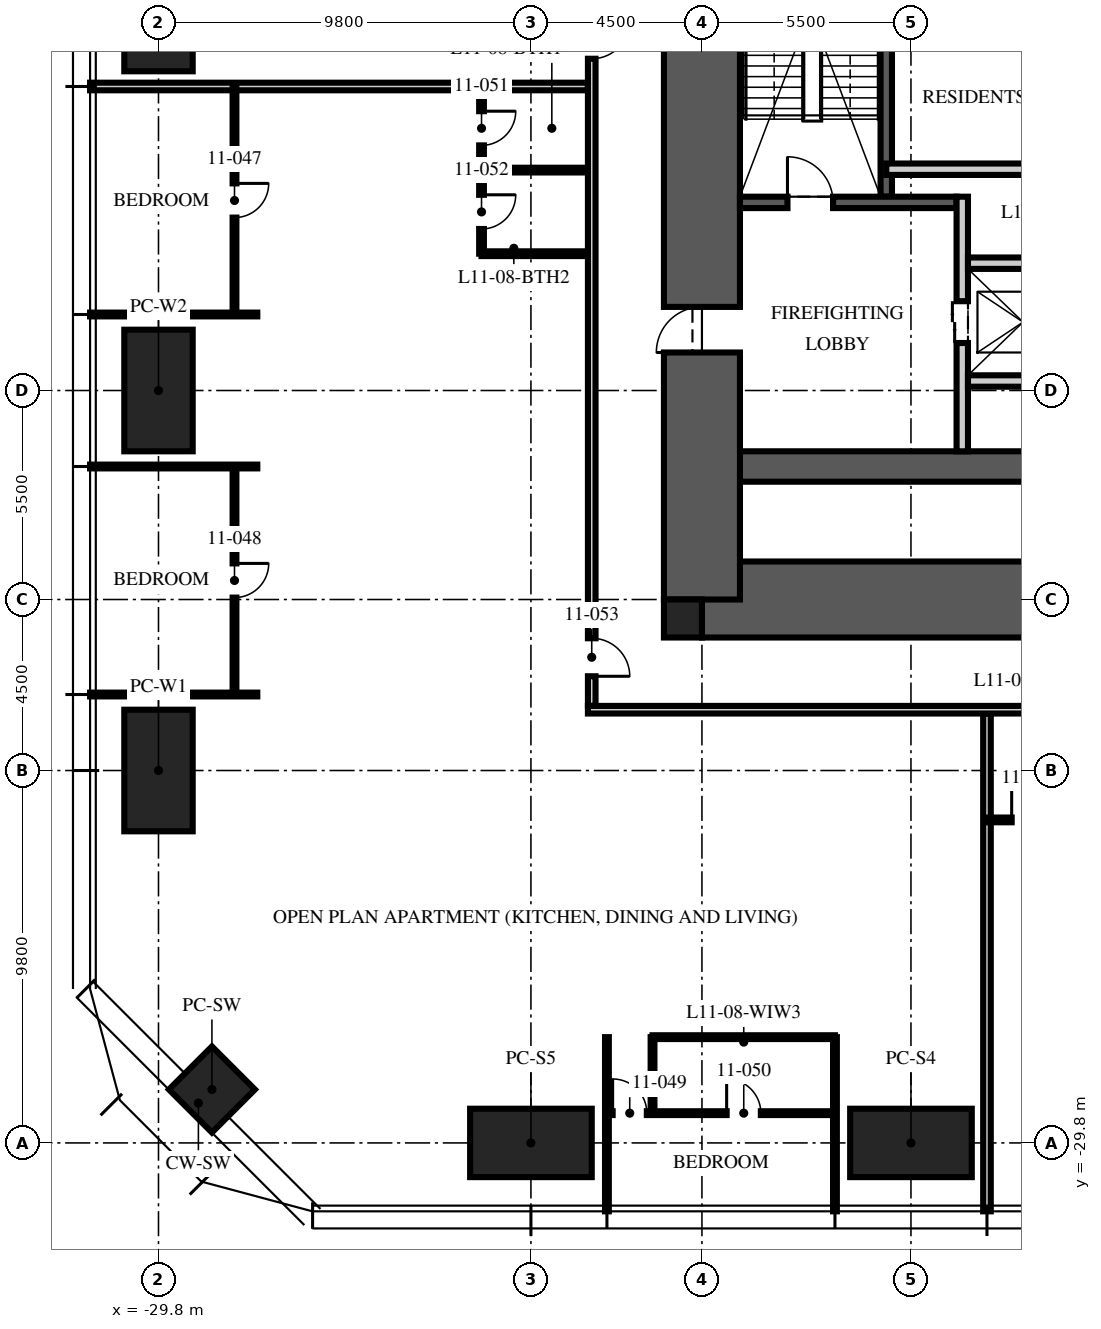
"""IFC4 building model, lengths in metres.
Left out: names, types, materials, properties, quantities, classifications, styles, units other than length and angle.
Written with IfcOpenShell. Run it as: python <this file> out.ifc"""

import sys

from ifc_helpers import new_model, si_unit, direction, frame, frame_2d, origin, origin_2d, place, context, subcontext, project, spatial, rectangle, hollow_rectangle, extrude, element, fill, save


model = new_model("IFC4")
c1 = context("Model", 3, precision=1e-05, world=origin(), true_north=direction((0.0, 1.0)))
c2 = subcontext(c1, "Body", "Model", "MODEL_VIEW")
j1 = project(units=[si_unit("LENGTHUNIT", "METRE"), si_unit("PLANEANGLEUNIT", "RADIAN")], contexts=[c1])
p1 = place(None, origin())
s1 = spatial("IfcSite", under=j1, at=p1, CompositionType="ELEMENT")
p2 = place(p1, origin())
s2 = spatial("IfcBuilding", under=s1, at=p2, CompositionType="ELEMENT")
p3 = place(p2, frame((0.0, 0.0, 47.25)))
s3 = spatial("IfcBuildingStorey", under=s2, at=p3, CompositionType="ELEMENT", Elevation=47.25)
p4 = place(p3, frame((-15.5, -15.5, -0.25), z_axis=(0.0, 0.0, 1.0), x_axis=(1.0, 0.0, 0.0)))
e1 = element("IfcWall", 1, at=p4, inside=s3, PredefinedType="SHEAR", context=c2, shape_type="SweptSolid", body=[
    extrude(rectangle(XDim=31.0, YDim=2.0, at=frame_2d((15.5, 0.0))), origin(), (0.0, 0.0, 1.0), 3.75),
])
p5 = place(p3, frame((-15.5, -12.0, -0.25), z_axis=(0.0, 0.0, 1.0), x_axis=(1.0, 0.0, 0.0)))
e2 = element("IfcWall", 2, at=p5, inside=s3, PredefinedType="SHEAR", context=c2, shape_type="SweptSolid", body=[
    extrude(rectangle(XDim=31.0, YDim=0.8, at=frame_2d((15.5, 0.0))), origin(), (0.0, 0.0, 1.0), 3.75),
])
p6 = place(p3, frame((-15.5, -15.5, -0.25), z_axis=(0.0, 0.0, 1.0), x_axis=(0.0, 1.0, 0.0)))
e3 = element("IfcWall", 3, at=p6, inside=s3, PredefinedType="SHEAR", context=c2, shape_type="SweptSolid", body=[
    extrude(rectangle(XDim=31.0, YDim=2.0, at=frame_2d((15.5, 0.0))), origin(), (0.0, 0.0, 1.0), 3.75),
])
p7 = place(p6, frame((6.5, 0.0, 0.25)))
e4 = element("IfcOpeningElement", 4, at=p7, cuts=e3, PredefinedType="OPENING", context=c2, shape_type="SweptSolid", body=[
    extrude(rectangle(XDim=1.2, YDim=2.1, at=frame_2d((0.6, 1.05))), frame((0.0, 1.01, 0.0), z_axis=(0.0, -1.0, 0.0), x_axis=(1.0, 0.0, 0.0)), (0.0, 0.0, 1.0), 2.02),
])
p8 = place(p6, frame((23.0, 0.0, 0.25)))
e5 = element("IfcOpeningElement", 5, at=p8, cuts=e3, PredefinedType="OPENING", context=c2, shape_type="SweptSolid", body=[
    extrude(rectangle(XDim=1.8, YDim=2.1, at=frame_2d((0.9, 1.05))), frame((0.0, 1.01, 0.0), z_axis=(0.0, -1.0, 0.0), x_axis=(1.0, 0.0, 0.0)), (0.0, 0.0, 1.0), 2.02),
])
p9 = place(p3, frame((-16.0, -16.0, -0.25), z_axis=(0.0, 0.0, 1.0), x_axis=(1.0, 0.0, 0.0)))
e6 = element("IfcColumn", 6, at=p9, inside=s3, PredefinedType="COLUMN", context=c2, shape_type="SweptSolid", body=[
    extrude(rectangle(XDim=1.0, YDim=1.0, at=origin_2d()), origin(), (0.0, 0.0, 1.0), 3.75),
])
for number, where, z_axis, x_axis in (
    (7, (-10.0, -29.8, 0.0), (0.0, 0.0, 1.0), (1.0, 0.0, 0.0)),
    (8, (-20.0, -29.8, 0.0), (0.0, 0.0, 1.0), (1.0, 0.0, 0.0)),
    (9, (-29.8, -20.0, 0.0), (0.0, 0.0, 1.0), (0.0, 1.0, 0.0)),
    (10, (-29.8, -10.0, 0.0), (0.0, 0.0, 1.0), (0.0, 1.0, 0.0)),
    (11, (-29.8, 0.0, 0.0), (0.0, 0.0, 1.0), (0.0, 1.0, 0.0)),
):
    element("IfcColumn", number, at=place(p3, frame(where, z_axis=z_axis, x_axis=x_axis)), inside=s3, PredefinedType="COLUMN", context=c2, shape_type="SweptSolid", body=[
        extrude(hollow_rectangle(XDim=3.2, YDim=1.8, WallThickness=0.2, at=origin_2d()), origin(), (0.0, 0.0, 1.0), 3.75),
    ])
p10 = place(p3, frame((-28.394, -28.394, 0.0), z_axis=(0.0, 0.0, 1.0), x_axis=(0.707106781187, -0.707106781187, 0.0)))
e12 = element("IfcColumn", 12, at=p10, inside=s3, PredefinedType="COLUMN", context=c2, shape_type="SweptSolid", body=[
    extrude(hollow_rectangle(XDim=1.6, YDim=1.6, WallThickness=0.1, at=origin_2d()), origin(), (0.0, 0.0, 1.0), 3.75),
])
p11 = place(p3, frame((-10.65, -4.9, 0.0), z_axis=(0.0, 0.0, 1.0), x_axis=(0.0, 1.0, 0.0)))
e13 = element("IfcWall", 13, at=p11, inside=s3, PredefinedType="SOLIDWALL", context=c2, shape_type="SweptSolid", body=[
    extrude(rectangle(XDim=10.1, YDim=0.3, at=frame_2d((5.05, 0.0))), origin(), (0.0, 0.0, 1.0), 3.5),
])
p12 = place(p3, frame((-14.5, -5.05, 0.0), z_axis=(0.0, 0.0, 1.0), x_axis=(1.0, 0.0, 0.0)))
e14 = element("IfcWall", 14, at=p12, inside=s3, PredefinedType="SOLIDWALL", context=c2, shape_type="SweptSolid", body=[
    extrude(rectangle(XDim=5.7, YDim=0.3, at=frame_2d((2.85, 0.0))), origin(), (0.0, 0.0, 1.0), 3.5),
])
p13 = place(p12, frame((1.25, 0.0, 0.0)))
e15 = element("IfcOpeningElement", 15, at=p13, cuts=e14, PredefinedType="OPENING", context=c2, shape_type="SweptSolid", body=[
    extrude(rectangle(XDim=1.2, YDim=2.1, at=frame_2d((0.6, 1.05))), frame((0.0, 0.16, 0.0), z_axis=(0.0, -1.0, 0.0), x_axis=(1.0, 0.0, 0.0)), (0.0, 0.0, 1.0), 0.32),
])
p14 = place(p3, frame((-8.65, -11.6, 0.0), z_axis=(0.0, 0.0, 1.0), x_axis=(0.0, 1.0, 0.0)))
e16 = element("IfcWall", 16, at=p14, inside=s3, PredefinedType="PARTITIONING", context=c2, shape_type="SweptSolid", body=[
    extrude(rectangle(XDim=6.7, YDim=0.3, at=frame_2d((3.35, 0.0))), origin(), (0.0, 0.0, 1.0), 3.5),
])
p15 = place(p14, frame((2.85, 0.0, 0.0)))
e17 = element("IfcOpeningElement", 17, at=p15, cuts=e16, PredefinedType="OPENING", context=c2, shape_type="SweptSolid", body=[
    extrude(rectangle(XDim=1.1, YDim=2.1, at=frame_2d((0.55, 1.05))), frame((0.0, 0.16, 0.0), z_axis=(0.0, -1.0, 0.0), x_axis=(1.0, 0.0, 0.0)), (0.0, 0.0, 1.0), 0.32),
])
p16 = place(p3, frame((-8.5, -6.65, 0.0), z_axis=(0.0, 0.0, 1.0), x_axis=(1.0, 0.0, 0.0)))
e18 = element("IfcWall", 18, at=p16, inside=s3, PredefinedType="PARTITIONING", context=c2, shape_type="SweptSolid", body=[
    extrude(rectangle(XDim=17.0, YDim=0.3, at=frame_2d((8.5, 0.0))), origin(), (0.0, 0.0, 1.0), 3.5),
])
p17 = place(p16, frame((7.8, 0.0, 0.0)))
e19 = element("IfcOpeningElement", 19, at=p17, cuts=e18, PredefinedType="OPENING", context=c2, shape_type="SweptSolid", body=[
    extrude(rectangle(XDim=1.3, YDim=2.4, at=frame_2d((0.65, 1.2))), frame((0.0, 0.16, 0.0), z_axis=(0.0, -1.0, 0.0), x_axis=(1.0, 0.0, 0.0)), (0.0, 0.0, 1.0), 0.32),
])
p18 = place(p16, frame((5.65, 0.0, 0.0)))
e20 = element("IfcOpeningElement", 20, at=p18, cuts=e18, PredefinedType="OPENING", context=c2, shape_type="SweptSolid", body=[
    extrude(rectangle(XDim=0.9, YDim=2.1, at=frame_2d((0.45, 1.05))), frame((0.0, 0.16, 0.0), z_axis=(0.0, -1.0, 0.0), x_axis=(1.0, 0.0, 0.0)), (0.0, 0.0, 1.0), 0.32),
])
p19 = place(p16, frame((10.4, 0.0, 0.0)))
e21 = element("IfcOpeningElement", 21, at=p19, cuts=e18, PredefinedType="OPENING", context=c2, shape_type="SweptSolid", body=[
    extrude(rectangle(XDim=0.9, YDim=2.1, at=frame_2d((0.45, 1.05))), frame((0.0, 0.16, 0.0), z_axis=(0.0, -1.0, 0.0), x_axis=(1.0, 0.0, 0.0)), (0.0, 0.0, 1.0), 0.32),
])
p20 = place(p3, frame((-8.5, -9.75, 0.0), z_axis=(0.0, 0.0, 1.0), x_axis=(1.0, 0.0, 0.0)))
e22 = element("IfcWall", 22, at=p20, inside=s3, PredefinedType="PARTITIONING", context=c2, shape_type="SweptSolid", body=[
    extrude(rectangle(XDim=2.9, YDim=0.3, at=frame_2d((1.45, 0.0))), origin(), (0.0, 0.0, 1.0), 3.5),
])
p21 = place(p3, frame((-10.65, -4.177, 0.0), z_axis=(0.0, 0.0, 1.0), x_axis=(1.0, 0.0, 0.0)))
e23 = element("IfcWall", 23, at=p21, inside=s3, PredefinedType="PARTITIONING", context=c2, shape_type="SweptSolid", body=[
    extrude(rectangle(XDim=6.45, YDim=0.3, at=frame_2d((3.225, 0.0))), origin(), (0.0, 0.0, 1.0), 3.5),
])
p22 = place(p3, frame((-18.5, -2.0, 0.0), z_axis=(0.0, 0.0, 1.0), x_axis=(-1.0, 0.0, 0.0)))
e24 = element("IfcWall", 24, at=p22, inside=s3, PredefinedType="PARTITIONING", context=c2, shape_type="SweptSolid", body=[
    extrude(rectangle(XDim=13.1, YDim=0.2, at=frame_2d((6.55, 0.0))), origin(), (0.0, 0.0, 1.0), 2.71),
])
for number, where, z_axis, x_axis in (
    (25, (-27.2, -8.0, 0.0), (0.0, 0.0, 1.0), (-1.0, 0.0, 0.0)),
    (26, (-27.2, -12.0, 0.0), (0.0, 0.0, 1.0), (-1.0, 0.0, 0.0)),
    (27, (-27.2, -18.0, 0.0), (0.0, 0.0, 1.0), (-1.0, 0.0, 0.0)),
):
    element("IfcWall", number, at=place(p3, frame(where, z_axis=z_axis, x_axis=x_axis)), inside=s3, PredefinedType="PARTITIONING", context=c2, shape_type="SweptSolid", body=[
        extrude(rectangle(XDim=4.4, YDim=0.1, at=frame_2d((2.2, 0.0))), origin(), (0.0, 0.0, 1.0), 2.71),
    ])
for number, where, z_axis, x_axis in (
    (28, (-18.0, -27.017, 0.0), (0.0, 0.0, 1.0), (0.0, -1.0, 0.0)),
    (29, (-12.0, -27.017, 0.0), (0.0, 0.0, 1.0), (0.0, -1.0, 0.0)),
):
    element("IfcWall", number, at=place(p3, frame(where, z_axis=z_axis, x_axis=x_axis)), inside=s3, PredefinedType="PARTITIONING", context=c2, shape_type="SweptSolid", body=[
        extrude(rectangle(XDim=4.583, YDim=0.1, at=frame_2d((2.292, 0.0))), origin(), (0.0, 0.0, 1.0), 2.71),
    ])
p23 = place(p3, frame((-8.0, -18.5, 0.0), z_axis=(0.0, 0.0, 1.0), x_axis=(0.0, -1.0, 0.0)))
e30 = element("IfcWall", 30, at=p23, inside=s3, PredefinedType="PARTITIONING", context=c2, shape_type="SweptSolid", body=[
    extrude(rectangle(XDim=13.1, YDim=0.2, at=frame_2d((6.55, 0.0))), origin(), (0.0, 0.0, 1.0), 2.71),
])
p24 = place(p3, frame((-27.8, -2.0, 0.0), z_axis=(0.0, 0.0, 1.0), x_axis=(0.0, -1.0, 0.0)))
e31 = element("IfcWall", 31, at=p24, inside=s3, PredefinedType="PARTITIONING", context=c2, shape_type="SweptSolid", body=[
    extrude(rectangle(XDim=6.0, YDim=0.1, at=frame_2d((3.0, 0.0))), origin(), (0.0, 0.0, 1.0), 2.61),
])
p25 = place(p24, frame((2.55, 0.0, 0.0)))
e32 = element("IfcOpeningElement", 32, at=p25, cuts=e31, PredefinedType="OPENING", context=c2, shape_type="SweptSolid", body=[
    extrude(rectangle(XDim=0.9, YDim=2.1, at=frame_2d((0.45, 1.05))), frame((0.0, 0.06, 0.0), z_axis=(0.0, -1.0, 0.0), x_axis=(1.0, 0.0, 0.0)), (0.0, 0.0, 1.0), 0.12),
])
p26 = place(p3, frame((-27.8, -12.0, 0.0), z_axis=(0.0, 0.0, 1.0), x_axis=(0.0, -1.0, 0.0)))
e33 = element("IfcWall", 33, at=p26, inside=s3, PredefinedType="PARTITIONING", context=c2, shape_type="SweptSolid", body=[
    extrude(rectangle(XDim=6.0, YDim=0.1, at=frame_2d((3.0, 0.0))), origin(), (0.0, 0.0, 1.0), 2.61),
])
p27 = place(p26, frame((2.55, 0.0, 0.0)))
e34 = element("IfcOpeningElement", 34, at=p27, cuts=e33, PredefinedType="OPENING", context=c2, shape_type="SweptSolid", body=[
    extrude(rectangle(XDim=0.9, YDim=2.1, at=frame_2d((0.45, 1.05))), frame((0.0, 0.06, 0.0), z_axis=(0.0, -1.0, 0.0), x_axis=(1.0, 0.0, 0.0)), (0.0, 0.0, 1.0), 0.12),
])
p28 = place(p3, frame((-18.0, -29.017, 0.0), z_axis=(0.0, 0.0, 1.0), x_axis=(1.0, 0.0, 0.0)))
e35 = element("IfcWall", 35, at=p28, inside=s3, PredefinedType="PARTITIONING", context=c2, shape_type="SweptSolid", body=[
    extrude(rectangle(XDim=6.0, YDim=0.1, at=frame_2d((3.0, 0.0))), origin(), (0.0, 0.0, 1.0), 2.61),
])
p29 = place(p28, frame((0.15, 0.0, 0.0)))
e36 = element("IfcOpeningElement", 36, at=p29, cuts=e35, PredefinedType="OPENING", context=c2, shape_type="SweptSolid", body=[
    extrude(rectangle(XDim=0.9, YDim=2.1, at=frame_2d((0.45, 1.05))), frame((0.0, 0.06, 0.0), z_axis=(0.0, -1.0, 0.0), x_axis=(1.0, 0.0, 0.0)), (0.0, 0.0, 1.0), 0.12),
])
p30 = place(p28, frame((3.15, 0.0, 0.0)))
e37 = element("IfcOpeningElement", 37, at=p30, cuts=e35, PredefinedType="OPENING", context=c2, shape_type="SweptSolid", body=[
    extrude(rectangle(XDim=0.9, YDim=2.1, at=frame_2d((0.45, 1.05))), frame((0.0, 0.06, 0.0), z_axis=(0.0, -1.0, 0.0), x_axis=(1.0, 0.0, 0.0)), (0.0, 0.0, 1.0), 0.12),
])
p31 = place(p3, frame((-16.8, -27.017, 0.0), z_axis=(0.0, 0.0, 1.0), x_axis=(0.0, -1.0, 0.0)))
e38 = element("IfcWall", 38, at=p31, inside=s3, PredefinedType="PARTITIONING", context=c2, shape_type="SweptSolid", body=[
    extrude(rectangle(XDim=2.0, YDim=0.1, at=frame_2d((1.0, 0.0))), origin(), (0.0, 0.0, 1.0), 3.5),
])
p32 = place(p3, frame((-16.8, -27.017, 0.0), z_axis=(0.0, 0.0, 1.0), x_axis=(1.0, 0.0, 0.0)))
e39 = element("IfcWall", 39, at=p32, inside=s3, PredefinedType="PARTITIONING", context=c2, shape_type="SweptSolid", body=[
    extrude(rectangle(XDim=4.8, YDim=0.1, at=frame_2d((2.4, 0.0))), origin(), (0.0, 0.0, 1.0), 2.61),
])
p33 = place(p3, frame((-21.3, -2.0, 0.0), z_axis=(0.0, 0.0, 1.0), x_axis=(0.0, -1.0, 0.0)))
e40 = element("IfcWall", 40, at=p33, inside=s3, PredefinedType="PARTITIONING", context=c2, shape_type="SweptSolid", body=[
    extrude(rectangle(XDim=4.4, YDim=0.125, at=frame_2d((2.2, 0.0))), origin(), (0.0, 0.0, 1.0), 2.61),
])
p34 = place(p33, frame((0.65, 0.0, 0.0)))
e41 = element("IfcOpeningElement", 41, at=p34, cuts=e40, PredefinedType="OPENING", context=c2, shape_type="SweptSolid", body=[
    extrude(rectangle(XDim=0.9, YDim=2.1, at=frame_2d((0.45, 1.05))), frame((0.0, 0.073, 0.0), z_axis=(0.0, -1.0, 0.0), x_axis=(1.0, 0.0, 0.0)), (0.0, 0.0, 1.0), 0.145),
])
p35 = place(p33, frame((2.85, 0.0, 0.0)))
e42 = element("IfcOpeningElement", 42, at=p35, cuts=e40, PredefinedType="OPENING", context=c2, shape_type="SweptSolid", body=[
    extrude(rectangle(XDim=0.9, YDim=2.1, at=frame_2d((0.45, 1.05))), frame((0.0, 0.073, 0.0), z_axis=(0.0, -1.0, 0.0), x_axis=(1.0, 0.0, 0.0)), (0.0, 0.0, 1.0), 0.145),
])
for number, where, z_axis, x_axis in (
    (43, (-18.5, -4.2, 0.0), (0.0, 0.0, 1.0), (-1.0, 0.0, 0.0)),
    (44, (-18.5, -6.4, 0.0), (0.0, 0.0, 1.0), (-1.0, 0.0, 0.0)),
):
    element("IfcWall", number, at=place(p3, frame(where, z_axis=z_axis, x_axis=x_axis)), inside=s3, PredefinedType="PARTITIONING", context=c2, shape_type="SweptSolid", body=[
        extrude(rectangle(XDim=2.8, YDim=0.125, at=frame_2d((1.4, 0.0))), origin(), (0.0, 0.0, 1.0), 3.5),
    ])
p36 = place(p3, frame((-8.0, -21.3, 0.0), z_axis=(0.0, 0.0, 1.0), x_axis=(1.0, 0.0, 0.0)))
e45 = element("IfcWall", 45, at=p36, inside=s3, PredefinedType="PARTITIONING", context=c2, shape_type="SweptSolid", body=[
    extrude(rectangle(XDim=2.2, YDim=0.125, at=frame_2d((1.1, 0.0))), origin(), (0.0, 0.0, 1.0), 3.5),
])
p37 = place(p36, frame((0.65, 0.0, 0.0)))
e46 = element("IfcOpeningElement", 46, at=p37, cuts=e45, PredefinedType="OPENING", context=c2, shape_type="SweptSolid", body=[
    extrude(rectangle(XDim=0.9, YDim=2.1, at=frame_2d((0.45, 1.05))), frame((0.0, 0.073, 0.0), z_axis=(0.0, -1.0, 0.0), x_axis=(1.0, 0.0, 0.0)), (0.0, 0.0, 1.0), 0.145),
])
p38 = place(p3, frame((-18.4, 18.3, 0.0), z_axis=(0.0, 0.0, 1.0), x_axis=(0.0, -1.0, 0.0)))
e47 = element("IfcWall", 47, at=p38, inside=s3, PredefinedType="PARTITIONING", context=c2, shape_type="SweptSolid", body=[
    extrude(rectangle(XDim=36.6, YDim=0.2, at=frame_2d((18.3, 0.0))), origin(), (0.0, 0.0, 1.0), 2.3),
])
p39 = place(p38, frame((8.87, 0.0, 0.0)))
e48 = element("IfcOpeningElement", 48, at=p39, cuts=e47, PredefinedType="OPENING", context=c2, shape_type="SweptSolid", body=[
    extrude(rectangle(XDim=1.0, YDim=2.2, at=frame_2d((0.5, 1.1))), frame((0.0, 0.11, 0.0), z_axis=(0.0, -1.0, 0.0), x_axis=(1.0, 0.0, 0.0)), (0.0, 0.0, 1.0), 0.22),
])
p40 = place(p38, frame((18.57, 0.0, 0.0)))
e49 = element("IfcOpeningElement", 49, at=p40, cuts=e47, PredefinedType="OPENING", context=c2, shape_type="SweptSolid", body=[
    extrude(rectangle(XDim=1.0, YDim=2.2, at=frame_2d((0.5, 1.1))), frame((0.0, 0.11, 0.0), z_axis=(0.0, -1.0, 0.0), x_axis=(1.0, 0.0, 0.0)), (0.0, 0.0, 1.0), 0.22),
])
p41 = place(p38, frame((34.82, 0.0, 0.0)))
e50 = element("IfcOpeningElement", 50, at=p41, cuts=e47, PredefinedType="OPENING", context=c2, shape_type="SweptSolid", body=[
    extrude(rectangle(XDim=1.0, YDim=2.2, at=frame_2d((0.5, 1.1))), frame((0.0, 0.11, 0.0), z_axis=(0.0, -1.0, 0.0), x_axis=(1.0, 0.0, 0.0)), (0.0, 0.0, 1.0), 0.22),
])
p42 = place(p3, frame((18.5, -18.4, 0.0), z_axis=(0.0, 0.0, 1.0), x_axis=(-1.0, 0.0, 0.0)))
e51 = element("IfcWall", 51, at=p42, inside=s3, PredefinedType="PARTITIONING", context=c2, shape_type="SweptSolid", body=[
    extrude(rectangle(XDim=37.0, YDim=0.2, at=frame_2d((18.5, 0.0))), origin(), (0.0, 0.0, 1.0), 2.3),
])
p43 = place(p42, frame((1.23, 0.0, 0.0)))
e52 = element("IfcOpeningElement", 52, at=p43, cuts=e51, PredefinedType="OPENING", context=c2, shape_type="SweptSolid", body=[
    extrude(rectangle(XDim=1.0, YDim=2.2, at=frame_2d((0.5, 1.1))), frame((0.0, 0.11, 0.0), z_axis=(0.0, -1.0, 0.0), x_axis=(1.0, 0.0, 0.0)), (0.0, 0.0, 1.0), 0.22),
])
p44 = place(p13, origin())
e53 = element("IfcDoor", 53, at=p44, inside=s3, OperationType="SINGLE_SWING_LEFT", PredefinedType="DOOR", context=c2, shape_type="SweptSolid", body=[
    extrude(rectangle(XDim=1.2, YDim=2.1, at=frame_2d((0.6, 1.05))), frame((0.0, 0.025, 0.0), z_axis=(0.0, -1.0, 0.0), x_axis=(1.0, 0.0, 0.0)), (0.0, 0.0, 1.0), 0.05),
])
fill(e15, e53)
p45 = place(p7, origin())
e54 = element("IfcDoor", 54, at=p45, inside=s3, OperationType="SINGLE_SWING_LEFT", PredefinedType="DOOR", context=c2, shape_type="SweptSolid", body=[
    extrude(rectangle(XDim=1.2, YDim=2.1, at=frame_2d((0.6, 1.05))), frame((0.0, 0.025, 0.0), z_axis=(0.0, -1.0, 0.0), x_axis=(1.0, 0.0, 0.0)), (0.0, 0.0, 1.0), 0.05),
])
fill(e4, e54)
p46 = place(p15, origin())
e55 = element("IfcDoor", 55, at=p46, inside=s3, OperationType="DOUBLE_DOOR_SLIDING", PredefinedType="DOOR", context=c2, shape_type="SweptSolid", body=[
    extrude(rectangle(XDim=1.1, YDim=2.1, at=frame_2d((0.55, 1.05))), frame((0.0, 0.025, 0.0), z_axis=(0.0, -1.0, 0.0), x_axis=(1.0, 0.0, 0.0)), (0.0, 0.0, 1.0), 0.05),
])
fill(e17, e55)
p47 = place(p40, origin())
e56 = element("IfcDoor", 56, at=p47, inside=s3, OperationType="SINGLE_SWING_LEFT", PredefinedType="DOOR", context=c2, shape_type="SweptSolid", body=[
    extrude(rectangle(XDim=1.0, YDim=2.2, at=frame_2d((0.5, 1.1))), frame((0.0, 0.025, 0.0), z_axis=(0.0, -1.0, 0.0), x_axis=(1.0, 0.0, 0.0)), (0.0, 0.0, 1.0), 0.05),
])
fill(e49, e56)
p48 = place(p25, origin())
e57 = element("IfcDoor", 57, at=p48, inside=s3, OperationType="SINGLE_SWING_LEFT", PredefinedType="DOOR", context=c2, shape_type="SweptSolid", body=[
    extrude(rectangle(XDim=0.9, YDim=2.1, at=frame_2d((0.45, 1.05))), frame((0.0, 0.025, 0.0), z_axis=(0.0, -1.0, 0.0), x_axis=(1.0, 0.0, 0.0)), (0.0, 0.0, 1.0), 0.05),
])
fill(e32, e57)
p49 = place(p27, origin())
e58 = element("IfcDoor", 58, at=p49, inside=s3, OperationType="SINGLE_SWING_LEFT", PredefinedType="DOOR", context=c2, shape_type="SweptSolid", body=[
    extrude(rectangle(XDim=0.9, YDim=2.1, at=frame_2d((0.45, 1.05))), frame((0.0, 0.025, 0.0), z_axis=(0.0, -1.0, 0.0), x_axis=(1.0, 0.0, 0.0)), (0.0, 0.0, 1.0), 0.05),
])
fill(e34, e58)
p50 = place(p29, origin())
e59 = element("IfcDoor", 59, at=p50, inside=s3, OperationType="SINGLE_SWING_LEFT", PredefinedType="DOOR", context=c2, shape_type="SweptSolid", body=[
    extrude(rectangle(XDim=0.9, YDim=2.1, at=frame_2d((0.45, 1.05))), frame((0.0, 0.025, 0.0), z_axis=(0.0, -1.0, 0.0), x_axis=(1.0, 0.0, 0.0)), (0.0, 0.0, 1.0), 0.05),
])
fill(e36, e59)
p51 = place(p30, origin())
e60 = element("IfcDoor", 60, at=p51, inside=s3, OperationType="SINGLE_SWING_LEFT", PredefinedType="DOOR", context=c2, shape_type="SweptSolid", body=[
    extrude(rectangle(XDim=0.9, YDim=2.1, at=frame_2d((0.45, 1.05))), frame((0.0, 0.025, 0.0), z_axis=(0.0, -1.0, 0.0), x_axis=(1.0, 0.0, 0.0)), (0.0, 0.0, 1.0), 0.05),
])
fill(e37, e60)
p52 = place(p34, origin())
e61 = element("IfcDoor", 61, at=p52, inside=s3, OperationType="SINGLE_SWING_LEFT", PredefinedType="DOOR", context=c2, shape_type="SweptSolid", body=[
    extrude(rectangle(XDim=0.9, YDim=2.1, at=frame_2d((0.45, 1.05))), frame((0.0, 0.025, 0.0), z_axis=(0.0, -1.0, 0.0), x_axis=(1.0, 0.0, 0.0)), (0.0, 0.0, 1.0), 0.05),
])
fill(e41, e61)
p53 = place(p35, origin())
e62 = element("IfcDoor", 62, at=p53, inside=s3, OperationType="SINGLE_SWING_LEFT", PredefinedType="DOOR", context=c2, shape_type="SweptSolid", body=[
    extrude(rectangle(XDim=0.9, YDim=2.1, at=frame_2d((0.45, 1.05))), frame((0.0, 0.025, 0.0), z_axis=(0.0, -1.0, 0.0), x_axis=(1.0, 0.0, 0.0)), (0.0, 0.0, 1.0), 0.05),
])
fill(e42, e62)
p54 = place(p41, origin())
e63 = element("IfcDoor", 63, at=p54, inside=s3, OperationType="SINGLE_SWING_RIGHT", PredefinedType="DOOR", context=c2, shape_type="SweptSolid", body=[
    extrude(rectangle(XDim=1.0, YDim=2.2, at=frame_2d((0.5, 1.1))), frame((0.0, 0.025, 0.0), z_axis=(0.0, -1.0, 0.0), x_axis=(1.0, 0.0, 0.0)), (0.0, 0.0, 1.0), 0.05),
])
fill(e50, e63)
p55 = place(p37, origin())
e64 = element("IfcDoor", 64, at=p55, inside=s3, OperationType="SINGLE_SWING_LEFT", PredefinedType="DOOR", context=c2, shape_type="SweptSolid", body=[
    extrude(rectangle(XDim=0.9, YDim=2.1, at=frame_2d((0.45, 1.05))), frame((0.0, 0.025, 0.0), z_axis=(0.0, -1.0, 0.0), x_axis=(1.0, 0.0, 0.0)), (0.0, 0.0, 1.0), 0.05),
])
fill(e46, e64)
save(model, sys.argv[1])
